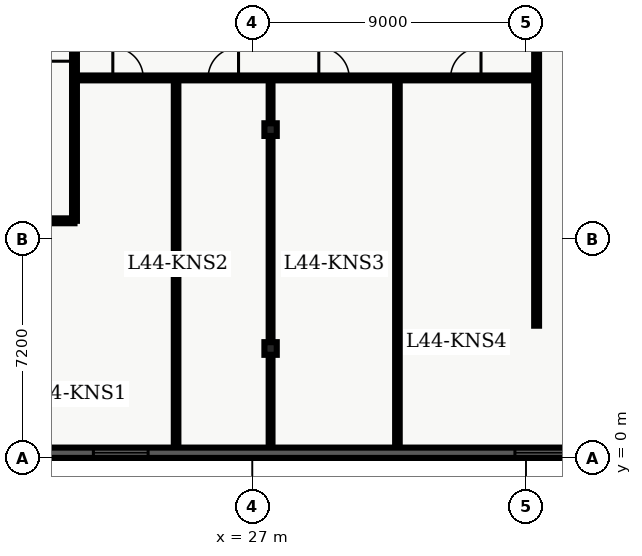
"""IFC4 building model, lengths in metres.
Left out: names, types, materials, properties, quantities, classifications, styles, units other than length and angle.
Written with IfcOpenShell. Run it as: python <this file> out.ifc"""

import sys

from ifc_helpers import new_model, entity, si_unit, converted_unit, direction, frame, origin_with_axes, origin_2d_with_axis, place, context, subcontext, project, spatial, polyline, rectangle, i_section, outline, extrude, element, fill, save


model = new_model("IFC4")
c1 = context("Model", 3, precision=1e-05, world=origin_with_axes(), true_north=direction((0.0, 1.0)))
c2 = subcontext(c1, "Body", "Model", "MODEL_VIEW")
j1 = project(units=[si_unit("LENGTHUNIT", "METRE"), converted_unit("PLANEANGLEUNIT", "DEGREE", entity("IfcPlaneAngleMeasure", 0.017), si_unit("PLANEANGLEUNIT", "RADIAN"), dimensions=[0, 0, 0, 0, 0, 0, 0])], contexts=[c1])
p1 = place(None, origin_with_axes())
s1 = spatial("IfcSite", under=j1, at=p1, CompositionType="ELEMENT")
p2 = place(p1, origin_with_axes())
s2 = spatial("IfcBuilding", under=s1, at=p2, CompositionType="ELEMENT")
p3 = place(p2, frame((0.0, 0.0, 179.7), z_axis=(0.0, 0.0, 1.0), x_axis=(1.0, 0.0, 0.0)))
s3 = spatial("IfcBuildingStorey", under=s2, at=p3, CompositionType="ELEMENT", Elevation=179.7)
for number, where, z_axis, x_axis in (
    (1, (27.6, 3.6, 0.0), (0.0, 0.0, 1.0), (1.0, 0.0, 0.0)),
    (2, (27.6, 10.8, 0.0), (0.0, 0.0, 1.0), (1.0, 0.0, 0.0)),
):
    element("IfcColumn", number, at=place(p3, frame(where, z_axis=z_axis, x_axis=x_axis)), inside=s3, PredefinedType="COLUMN", context=c2, shape_type="SweptSolid", body=[
        extrude(i_section(OverallWidth=0.406, OverallDepth=0.416, WebThickness=0.03, FlangeThickness=0.048, FilletRadius=0.022, at=origin_2d_with_axis()), origin_with_axes(), (0.0, 0.0, 1.0), 3.9),
    ])
p4 = place(p3, frame((2.6, 7.8, 0.0), z_axis=(0.0, 0.0, 1.0), x_axis=(1.0, 0.0, 0.0)))
e3 = element("IfcWall", 3, at=p4, inside=s3, PredefinedType="PARTITIONING", context=c2, shape_type="SweptSolid", body=[
    extrude(outline(polyline([(0.0, -0.08), (18.55, -0.08), (18.55, 0.08), (0.0, 0.08), (0.0, -0.08)])), origin_with_axes(), (0.0, 0.0, 1.0), 2.7),
])
p5 = place(p4, frame((1.851, 0.0, 0.0), z_axis=(0.0, 0.0, 1.0), x_axis=(1.0, 0.0, 0.0)))
e4 = element("IfcOpeningElement", 4, at=p5, cuts=e3, PredefinedType="OPENING", context=c2, shape_type="SweptSolid", body=[
    extrude(rectangle(XDim=1.0, YDim=0.18, at=origin_2d_with_axis()), origin_with_axes(), (0.0, 0.0, 1.0), 2.15),
])
p6 = place(p4, frame((6.255, 0.0, 0.0), z_axis=(0.0, 0.0, 1.0), x_axis=(1.0, 0.0, 0.0)))
e5 = element("IfcOpeningElement", 5, at=p6, cuts=e3, PredefinedType="OPENING", context=c2, shape_type="SweptSolid", body=[
    extrude(rectangle(XDim=1.0, YDim=0.18, at=origin_2d_with_axis()), origin_with_axes(), (0.0, 0.0, 1.0), 2.15),
])
p7 = place(p4, frame((10.794, 0.0, 0.0), z_axis=(0.0, 0.0, 1.0), x_axis=(1.0, 0.0, 0.0)))
e6 = element("IfcOpeningElement", 6, at=p7, cuts=e3, PredefinedType="OPENING", context=c2, shape_type="SweptSolid", body=[
    extrude(rectangle(XDim=1.0, YDim=0.18, at=origin_2d_with_axis()), origin_with_axes(), (0.0, 0.0, 1.0), 2.15),
])
p8 = place(p4, frame((15.645, 0.0, 0.0), z_axis=(0.0, 0.0, 1.0), x_axis=(1.0, 0.0, 0.0)))
e7 = element("IfcOpeningElement", 7, at=p8, cuts=e3, PredefinedType="OPENING", context=c2, shape_type="SweptSolid", body=[
    extrude(rectangle(XDim=1.0, YDim=0.18, at=origin_2d_with_axis()), origin_with_axes(), (0.0, 0.0, 1.0), 2.15),
])
p9 = place(p3, frame((21.15, 7.8, 0.0), z_axis=(0.0, 0.0, 1.0), x_axis=(0.0, 1.0, 0.0)))
e8 = element("IfcWall", 8, at=p9, inside=s3, PredefinedType="PARTITIONING", context=c2, shape_type="SweptSolid", body=[
    extrude(outline(polyline([(0.0, -0.08), (32.7, -0.08), (32.7, 0.08), (0.0, 0.08), (0.0, -0.08)])), origin_with_axes(), (0.0, 0.0, 1.0), 2.7),
])
p10 = place(p9, frame((16.495, 0.0, 0.0), z_axis=(0.0, 0.0, 1.0), x_axis=(1.0, 0.0, 0.0)))
e9 = element("IfcOpeningElement", 9, at=p10, cuts=e8, PredefinedType="OPENING", context=c2, shape_type="SweptSolid", body=[
    extrude(rectangle(XDim=1.0, YDim=0.18, at=origin_2d_with_axis()), origin_with_axes(), (0.0, 0.0, 1.0), 2.15),
])
p11 = place(p9, frame((22.148, 0.0, 0.0), z_axis=(0.0, 0.0, 1.0), x_axis=(1.0, 0.0, 0.0)))
e10 = element("IfcOpeningElement", 10, at=p11, cuts=e8, PredefinedType="OPENING", context=c2, shape_type="SweptSolid", body=[
    extrude(rectangle(XDim=1.0, YDim=0.18, at=origin_2d_with_axis()), origin_with_axes(), (0.0, 0.0, 1.0), 2.15),
])
p12 = place(p9, frame((28.902, 0.0, 0.0), z_axis=(0.0, 0.0, 1.0), x_axis=(1.0, 0.0, 0.0)))
e11 = element("IfcOpeningElement", 11, at=p12, cuts=e8, PredefinedType="OPENING", context=c2, shape_type="SweptSolid", body=[
    extrude(rectangle(XDim=1.0, YDim=0.18, at=origin_2d_with_axis()), origin_with_axes(), (0.0, 0.0, 1.0), 2.15),
])
p13 = place(p9, frame((5.775, 0.0, 0.0), z_axis=(0.0, 0.0, 1.0), x_axis=(1.0, 0.0, 0.0)))
e12 = element("IfcOpeningElement", 12, at=p13, cuts=e8, PredefinedType="OPENING", context=c2, shape_type="SweptSolid", body=[
    extrude(rectangle(XDim=1.05, YDim=0.18, at=origin_2d_with_axis()), origin_with_axes(), (0.0, 0.0, 1.0), 2.15),
])
p14 = place(p3, frame((21.15, 12.5, 0.0), z_axis=(0.0, 0.0, 1.0), x_axis=(1.0, 0.0, 0.0)))
e13 = element("IfcWall", 13, at=p14, inside=s3, PredefinedType="PARTITIONING", context=c2, shape_type="SweptSolid", body=[
    extrude(outline(polyline([(0.0, -0.08), (15.2, -0.08), (15.2, 0.08), (0.0, 0.08), (0.0, -0.08)])), origin_with_axes(), (0.0, 0.0, 1.0), 2.7),
])
p15 = place(p14, frame((1.761, 0.0, 0.0), z_axis=(0.0, 0.0, 1.0), x_axis=(1.0, 0.0, 0.0)))
e14 = element("IfcOpeningElement", 14, at=p15, cuts=e13, PredefinedType="OPENING", context=c2, shape_type="SweptSolid", body=[
    extrude(rectangle(XDim=1.0, YDim=0.18, at=origin_2d_with_axis()), origin_with_axes(), (0.0, 0.0, 1.0), 2.15),
])
p16 = place(p14, frame((4.896, 0.0, 0.0), z_axis=(0.0, 0.0, 1.0), x_axis=(1.0, 0.0, 0.0)))
e15 = element("IfcOpeningElement", 15, at=p16, cuts=e13, PredefinedType="OPENING", context=c2, shape_type="SweptSolid", body=[
    extrude(rectangle(XDim=1.0, YDim=0.18, at=origin_2d_with_axis()), origin_with_axes(), (0.0, 0.0, 1.0), 2.15),
])
p17 = place(p14, frame((8.536, 0.0, 0.0), z_axis=(0.0, 0.0, 1.0), x_axis=(1.0, 0.0, 0.0)))
e16 = element("IfcOpeningElement", 16, at=p17, cuts=e13, PredefinedType="OPENING", context=c2, shape_type="SweptSolid", body=[
    extrude(rectangle(XDim=1.0, YDim=0.18, at=origin_2d_with_axis()), origin_with_axes(), (0.0, 0.0, 1.0), 2.15),
])
p18 = place(p14, frame((12.871, 0.0, 0.0), z_axis=(0.0, 0.0, 1.0), x_axis=(1.0, 0.0, 0.0)))
e17 = element("IfcOpeningElement", 17, at=p18, cuts=e13, PredefinedType="OPENING", context=c2, shape_type="SweptSolid", body=[
    extrude(rectangle(XDim=1.0, YDim=0.18, at=origin_2d_with_axis()), origin_with_axes(), (0.0, 0.0, 1.0), 2.15),
])
p19 = place(p3, frame((36.35, 4.35, 0.0), z_axis=(0.0, 0.0, 1.0), x_axis=(0.0, 1.0, 0.0)))
e18 = element("IfcWall", 18, at=p19, inside=s3, PredefinedType="PARTITIONING", context=c2, shape_type="SweptSolid", body=[
    extrude(outline(polyline([(0.0, -0.08), (16.95, -0.08), (16.95, 0.08), (0.0, 0.08), (0.0, -0.08)])), origin_with_axes(), (0.0, 0.0, 1.0), 2.7),
])
p20 = place(p3, frame((24.492, 0.335, 0.0), z_axis=(0.0, 0.0, 1.0), x_axis=(0.0, 1.0, 0.0)))
e19 = element("IfcWall", 19, at=p20, inside=s3, PredefinedType="PARTITIONING", context=c2, shape_type="SweptSolid", body=[
    extrude(outline(polyline([(0.0, -0.075), (12.045, -0.075), (12.045, 0.075), (0.0, 0.075), (0.0, -0.075)])), origin_with_axes(), (0.0, 0.0, 1.0), 2.7),
])
p21 = place(p3, frame((27.6, 0.335, 0.0), z_axis=(0.0, 0.0, 1.0), x_axis=(0.0, 1.0, 0.0)))
e20 = element("IfcWall", 20, at=p21, inside=s3, PredefinedType="PARTITIONING", context=c2, shape_type="SweptSolid", body=[
    extrude(outline(polyline([(0.0, -0.062), (12.045, -0.062), (12.045, 0.062), (0.0, 0.062), (0.0, -0.062)])), origin_with_axes(), (0.0, 0.0, 1.0), 2.7),
])
p22 = place(p3, frame((31.772, 0.335, 0.0), z_axis=(0.0, 0.0, 1.0), x_axis=(0.0, 1.0, 0.0)))
e21 = element("IfcWall", 21, at=p22, inside=s3, PredefinedType="PARTITIONING", context=c2, shape_type="SweptSolid", body=[
    extrude(outline(polyline([(0.0, -0.075), (12.045, -0.075), (12.045, 0.075), (0.0, 0.075), (0.0, -0.075)])), origin_with_axes(), (0.0, 0.0, 1.0), 2.7),
])
p23 = place(p3, frame((57.26, 0.17, 0.0), z_axis=(0.0, 0.0, 1.0), x_axis=(-1.0, 0.0, 0.0)))
e22 = element("IfcWall", 22, at=p23, inside=s3, PredefinedType="SOLIDWALL", context=c2, shape_type="SweptSolid", body=[
    extrude(outline(polyline([(0.0, -0.17), (54.86, -0.17), (54.86, 0.17), (0.0, 0.17), (0.0, -0.17)])), origin_with_axes(), (0.0, 0.0, 1.0), 3.66),
])
p24 = place(p23, frame((2.836, 0.0, 0.45), z_axis=(0.0, 0.0, 1.0), x_axis=(1.0, 0.0, 0.0)))
e23 = element("IfcOpeningElement", 23, at=p24, cuts=e22, PredefinedType="OPENING", context=c2, shape_type="SweptSolid", body=[
    extrude(rectangle(XDim=1.8, YDim=0.36, at=origin_2d_with_axis()), origin_with_axes(), (0.0, 0.0, 1.0), 2.1),
])
p25 = place(p23, frame((7.307, 0.0, 0.45), z_axis=(0.0, 0.0, 1.0), x_axis=(1.0, 0.0, 0.0)))
e24 = element("IfcOpeningElement", 24, at=p25, cuts=e22, PredefinedType="OPENING", context=c2, shape_type="SweptSolid", body=[
    extrude(rectangle(XDim=1.8, YDim=0.36, at=origin_2d_with_axis()), origin_with_axes(), (0.0, 0.0, 1.0), 2.1),
])
p26 = place(p23, frame((11.779, 0.0, 0.45), z_axis=(0.0, 0.0, 1.0), x_axis=(1.0, 0.0, 0.0)))
e25 = element("IfcOpeningElement", 25, at=p26, cuts=e22, PredefinedType="OPENING", context=c2, shape_type="SweptSolid", body=[
    extrude(rectangle(XDim=1.8, YDim=0.36, at=origin_2d_with_axis()), origin_with_axes(), (0.0, 0.0, 1.0), 2.1),
])
p27 = place(p23, frame((16.251, 0.0, 0.45), z_axis=(0.0, 0.0, 1.0), x_axis=(1.0, 0.0, 0.0)))
e26 = element("IfcOpeningElement", 26, at=p27, cuts=e22, PredefinedType="OPENING", context=c2, shape_type="SweptSolid", body=[
    extrude(rectangle(XDim=1.8, YDim=0.36, at=origin_2d_with_axis()), origin_with_axes(), (0.0, 0.0, 1.0), 2.1),
])
p28 = place(p23, frame((20.723, 0.0, 0.45), z_axis=(0.0, 0.0, 1.0), x_axis=(1.0, 0.0, 0.0)))
e27 = element("IfcOpeningElement", 27, at=p28, cuts=e22, PredefinedType="OPENING", context=c2, shape_type="SweptSolid", body=[
    extrude(rectangle(XDim=1.8, YDim=0.36, at=origin_2d_with_axis()), origin_with_axes(), (0.0, 0.0, 1.0), 2.1),
])
p29 = place(p23, frame((34.588, 0.0, 0.45), z_axis=(0.0, 0.0, 1.0), x_axis=(1.0, 0.0, 0.0)))
e28 = element("IfcOpeningElement", 28, at=p29, cuts=e22, PredefinedType="OPENING", context=c2, shape_type="SweptSolid", body=[
    extrude(rectangle(XDim=1.8, YDim=0.36, at=origin_2d_with_axis()), origin_with_axes(), (0.0, 0.0, 1.0), 2.1),
])
p30 = place(p23, frame((38.609, 0.0, 0.45), z_axis=(0.0, 0.0, 1.0), x_axis=(1.0, 0.0, 0.0)))
e29 = element("IfcOpeningElement", 29, at=p30, cuts=e22, PredefinedType="OPENING", context=c2, shape_type="SweptSolid", body=[
    extrude(rectangle(XDim=1.8, YDim=0.36, at=origin_2d_with_axis()), origin_with_axes(), (0.0, 0.0, 1.0), 2.1),
])
p31 = place(p23, frame((43.531, 0.0, 0.45), z_axis=(0.0, 0.0, 1.0), x_axis=(1.0, 0.0, 0.0)))
e30 = element("IfcOpeningElement", 30, at=p31, cuts=e22, PredefinedType="OPENING", context=c2, shape_type="SweptSolid", body=[
    extrude(rectangle(XDim=1.8, YDim=0.36, at=origin_2d_with_axis()), origin_with_axes(), (0.0, 0.0, 1.0), 2.1),
])
p32 = place(p23, frame((47.553, 0.0, 0.45), z_axis=(0.0, 0.0, 1.0), x_axis=(1.0, 0.0, 0.0)))
e31 = element("IfcOpeningElement", 31, at=p32, cuts=e22, PredefinedType="OPENING", context=c2, shape_type="SweptSolid", body=[
    extrude(rectangle(XDim=1.8, YDim=0.36, at=origin_2d_with_axis()), origin_with_axes(), (0.0, 0.0, 1.0), 2.1),
])
p33 = place(p23, frame((52.474, 0.0, 0.45), z_axis=(0.0, 0.0, 1.0), x_axis=(1.0, 0.0, 0.0)))
e32 = element("IfcOpeningElement", 32, at=p33, cuts=e22, PredefinedType="OPENING", context=c2, shape_type="SweptSolid", body=[
    extrude(rectangle(XDim=1.8, YDim=0.36, at=origin_2d_with_axis()), origin_with_axes(), (0.0, 0.0, 1.0), 2.1),
])
p34 = place(p9, frame((5.775, 0.0, 0.0), z_axis=(0.0, 0.0, 1.0), x_axis=(1.0, 0.0, 0.0)))
e33 = element("IfcDoor", 33, at=p34, inside=s3, OperationType="SINGLE_SWING_LEFT", PredefinedType="DOOR", context=c2, shape_type="SweptSolid", body=[
    extrude(rectangle(XDim=1.05, YDim=0.09, at=origin_2d_with_axis()), origin_with_axes(), (0.0, 0.0, 1.0), 2.15),
])
fill(e12, e33)
p35 = place(p14, frame((1.761, 0.0, 0.0), z_axis=(0.0, 0.0, 1.0), x_axis=(1.0, 0.0, 0.0)))
e34 = element("IfcDoor", 34, at=p35, inside=s3, OperationType="SINGLE_SWING_LEFT", PredefinedType="DOOR", context=c2, shape_type="SweptSolid", body=[
    extrude(rectangle(XDim=1.0, YDim=0.09, at=origin_2d_with_axis()), origin_with_axes(), (0.0, 0.0, 1.0), 2.15),
])
fill(e14, e34)
p36 = place(p14, frame((4.896, 0.0, 0.0), z_axis=(0.0, 0.0, 1.0), x_axis=(1.0, 0.0, 0.0)))
e35 = element("IfcDoor", 35, at=p36, inside=s3, OperationType="SINGLE_SWING_RIGHT", PredefinedType="DOOR", context=c2, shape_type="SweptSolid", body=[
    extrude(rectangle(XDim=1.0, YDim=0.09, at=origin_2d_with_axis()), origin_with_axes(), (0.0, 0.0, 1.0), 2.15),
])
fill(e15, e35)
p37 = place(p14, frame((8.536, 0.0, 0.0), z_axis=(0.0, 0.0, 1.0), x_axis=(1.0, 0.0, 0.0)))
e36 = element("IfcDoor", 36, at=p37, inside=s3, OperationType="SINGLE_SWING_LEFT", PredefinedType="DOOR", context=c2, shape_type="SweptSolid", body=[
    extrude(rectangle(XDim=1.0, YDim=0.09, at=origin_2d_with_axis()), origin_with_axes(), (0.0, 0.0, 1.0), 2.15),
])
fill(e16, e36)
p38 = place(p14, frame((12.871, 0.0, 0.0), z_axis=(0.0, 0.0, 1.0), x_axis=(1.0, 0.0, 0.0)))
e37 = element("IfcDoor", 37, at=p38, inside=s3, OperationType="SINGLE_SWING_RIGHT", PredefinedType="DOOR", context=c2, shape_type="SweptSolid", body=[
    extrude(rectangle(XDim=1.0, YDim=0.09, at=origin_2d_with_axis()), origin_with_axes(), (0.0, 0.0, 1.0), 2.15),
])
fill(e17, e37)
p39 = place(p23, frame((20.723, 0.0, 0.45), z_axis=(0.0, 0.0, 1.0), x_axis=(1.0, 0.0, 0.0)))
e38 = element("IfcWindow", 38, at=p39, inside=s3, PredefinedType="WINDOW", context=c2, shape_type="SweptSolid", body=[
    extrude(rectangle(XDim=1.8, YDim=0.09, at=origin_2d_with_axis()), origin_with_axes(), (0.0, 0.0, 1.0), 2.1),
])
fill(e27, e38)
p40 = place(p23, frame((34.588, 0.0, 0.45), z_axis=(0.0, 0.0, 1.0), x_axis=(1.0, 0.0, 0.0)))
e39 = element("IfcWindow", 39, at=p40, inside=s3, PredefinedType="WINDOW", context=c2, shape_type="SweptSolid", body=[
    extrude(rectangle(XDim=1.8, YDim=0.09, at=origin_2d_with_axis()), origin_with_axes(), (0.0, 0.0, 1.0), 2.1),
])
fill(e28, e39)
save(model, sys.argv[1])
